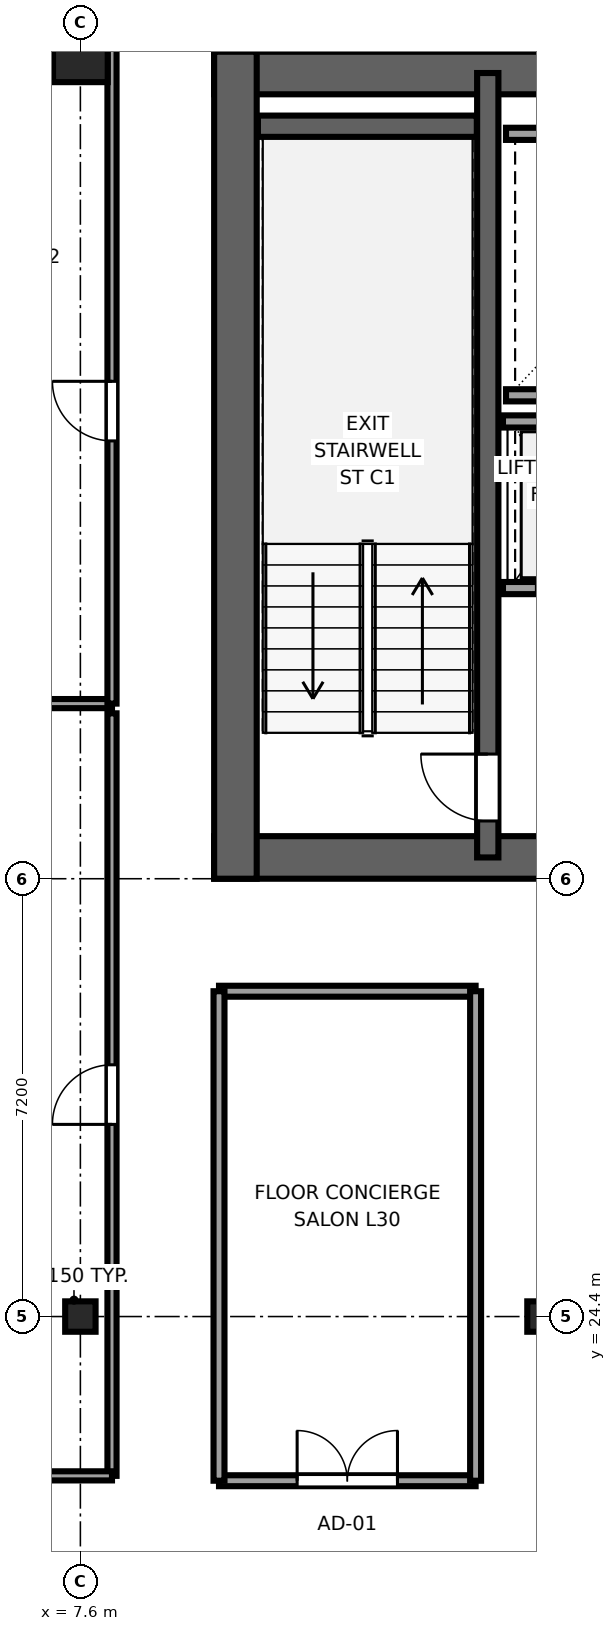
"""IFC4 building model, lengths in metres.
Left out: names, types, materials, properties, quantities, classifications, styles, units other than length and angle.
Written with IfcOpenShell. Run it as: python <this file> out.ifc"""

import sys

from ifc_helpers import new_model, si_unit, direction, frame, frame_2d, origin, origin_2d, place, context, subcontext, project, spatial, rectangle, i_section, extrude, source, transform, mapped, element, fill, save


model = new_model("IFC4")
c1 = context("Model", 3, precision=1e-05, world=origin(), true_north=direction((0.0, 1.0)))
c2 = subcontext(c1, "Body", "Model", "MODEL_VIEW")
j1 = project(units=[si_unit("LENGTHUNIT", "METRE"), si_unit("PLANEANGLEUNIT", "RADIAN")], contexts=[c1])
p1 = place(None, origin())
s1 = spatial("IfcSite", under=j1, at=p1, CompositionType="ELEMENT")
p2 = place(p1, origin())
s2 = spatial("IfcBuilding", under=s1, at=p2, CompositionType="ELEMENT")
p3 = place(p2, frame((0.0, 0.0, 118.65)))
s3 = spatial("IfcBuildingStorey", under=s2, at=p3, CompositionType="ELEMENT", Elevation=118.65)
p4 = place(p3, frame((9.8, 31.95, 0.0), z_axis=(0.0, 0.0, 1.0), x_axis=(1.0, 0.0, 0.0)))
e1 = element("IfcWall", 1, at=p4, inside=s3, PredefinedType="SHEAR", context=c2, shape_type="SweptSolid", body=[
    extrude(rectangle(XDim=26.4, YDim=0.7, at=frame_2d((13.2, 0.0))), origin(), (0.0, 0.0, 1.0), 3.55),
])
p5 = place(p4, frame((7.65, 0.0, 0.0), z_axis=(0.0, 0.0, 1.0), x_axis=(-1.0, 0.0, 0.0)))
e2 = element("IfcOpeningElement", 2, at=p5, cuts=e1, PredefinedType="OPENING", context=c2, shape_type="SweptSolid", body=[
    extrude(rectangle(XDim=1.5, YDim=2.04, at=frame_2d((0.75, 1.02))), frame((0.0, 0.36, 0.0), z_axis=(0.0, -1.0, 0.0), x_axis=(1.0, 0.0, 0.0)), (0.0, 0.0, 1.0), 0.72),
])
p6 = place(p4, frame((13.95, 0.0, 0.0), z_axis=(0.0, 0.0, 1.0), x_axis=(-1.0, 0.0, 0.0)))
e3 = element("IfcOpeningElement", 3, at=p6, cuts=e1, PredefinedType="OPENING", context=c2, shape_type="SweptSolid", body=[
    extrude(rectangle(XDim=1.5, YDim=2.04, at=frame_2d((0.75, 1.02))), frame((0.0, 0.36, 0.0), z_axis=(0.0, -1.0, 0.0), x_axis=(1.0, 0.0, 0.0)), (0.0, 0.0, 1.0), 0.72),
])
p7 = place(p4, frame((20.25, 0.0, 0.0), z_axis=(0.0, 0.0, 1.0), x_axis=(-1.0, 0.0, 0.0)))
e4 = element("IfcOpeningElement", 4, at=p7, cuts=e1, PredefinedType="OPENING", context=c2, shape_type="SweptSolid", body=[
    extrude(rectangle(XDim=1.5, YDim=2.04, at=frame_2d((0.75, 1.02))), frame((0.0, 0.36, 0.0), z_axis=(0.0, -1.0, 0.0), x_axis=(1.0, 0.0, 0.0)), (0.0, 0.0, 1.0), 0.72),
])
p8 = place(p3, frame((9.8, 44.85, 0.0), z_axis=(0.0, 0.0, 1.0), x_axis=(1.0, 0.0, 0.0)))
e5 = element("IfcWall", 5, at=p8, inside=s3, PredefinedType="SHEAR", context=c2, shape_type="SweptSolid", body=[
    extrude(rectangle(XDim=26.4, YDim=0.7, at=frame_2d((13.2, 0.0))), origin(), (0.0, 0.0, 1.0), 3.55),
])
p9 = place(p3, frame((10.15, 31.6, 0.0), z_axis=(0.0, 0.0, 1.0), x_axis=(0.0, 1.0, 0.0)))
e6 = element("IfcWall", 6, at=p9, inside=s3, PredefinedType="SHEAR", context=c2, shape_type="SweptSolid", body=[
    extrude(rectangle(XDim=13.6, YDim=0.7, at=frame_2d((6.8, 0.0))), origin(), (0.0, 0.0, 1.0), 3.55),
])
p10 = place(p3, frame((14.3, 31.95, 0.0), z_axis=(0.0, 0.0, 1.0), x_axis=(0.0, 1.0, 0.0)))
e7 = element("IfcWall", 7, at=p10, inside=s3, PredefinedType="SHEAR", context=c2, shape_type="SweptSolid", body=[
    extrude(rectangle(XDim=12.9, YDim=0.35, at=frame_2d((6.45, 0.0))), origin(), (0.0, 0.0, 1.0), 3.55),
])
p11 = place(p10, frame((0.6, 0.0, 0.0)))
e8 = element("IfcOpeningElement", 8, at=p11, cuts=e7, PredefinedType="OPENING", context=c2, shape_type="SweptSolid", body=[
    extrude(rectangle(XDim=1.1, YDim=2.12, at=frame_2d((0.55, 1.06))), frame((0.0, 0.185, 0.0), z_axis=(0.0, -1.0, 0.0), x_axis=(1.0, 0.0, 0.0)), (0.0, 0.0, 1.0), 0.37),
])
p12 = place(p3, frame((10.52, 43.975, 0.0), z_axis=(0.0, 0.0, 1.0), x_axis=(1.0, 0.0, 0.0)))
e9 = element("IfcWall", 9, at=p12, inside=s3, PredefinedType="SHEAR", context=c2, shape_type="SweptSolid", body=[
    extrude(rectangle(XDim=3.6, YDim=0.35, at=frame_2d((1.8, 0.0))), origin(), (0.0, 0.0, 1.0), 3.55),
])
m1 = source(origin(), c2, "Body", "SweptSolid", [
    extrude(i_section(OverallWidth=0.5, OverallDepth=0.5, WebThickness=0.022, FlangeThickness=0.034, at=origin_2d()), origin(), (0.0, 0.0, 1.0), 3.55),
])
for number, where, z_axis, x_axis in (
    (10, (7.6, 24.4, 0.0), (0.0, 0.0, 1.0), (1.0, 0.0, 0.0)),
    (11, (15.2, 24.4, 0.0), (0.0, 0.0, 1.0), (1.0, 0.0, 0.0)),
):
    element("IfcColumn", number, at=place(p3, frame(where, z_axis=z_axis, x_axis=x_axis)), inside=s3, PredefinedType="COLUMN", context=c2, shape_type="MappedRepresentation", body=[
        mapped(m1, transform((0.0, 0.0, 0.0), x_axis=(1.0, 0.0, 0.0), y_axis=(0.0, 1.0, 0.0), z_axis=(0.0, 0.0, 1.0), scale=1.0)),
    ])
m2 = source(origin(), c2, "Body", "SweptSolid", [
    extrude(rectangle(XDim=0.9, YDim=0.9, at=origin_2d()), origin(), (0.0, 0.0, 1.0), 3.55),
])
p13 = place(p3, frame((7.6, 45.15, 0.0), z_axis=(0.0, 0.0, 1.0), x_axis=(1.0, 0.0, 0.0)))
e12 = element("IfcColumn", 12, at=p13, inside=s3, PredefinedType="COLUMN", context=c2, shape_type="MappedRepresentation", body=[
    mapped(m2, transform((0.0, 0.0, 0.0), x_axis=(1.0, 0.0, 0.0), y_axis=(0.0, 1.0, 0.0), z_axis=(0.0, 0.0, 1.0), scale=1.0)),
])
for number, where, z_axis, x_axis in (
    (13, (14.6, 39.55, 0.0), (0.0, 0.0, 1.0), (1.0, 0.0, 0.0)),
    (14, (14.6, 43.85, 0.0), (0.0, 0.0, 1.0), (1.0, 0.0, 0.0)),
):
    element("IfcWall", number, at=place(p3, frame(where, z_axis=z_axis, x_axis=x_axis)), inside=s3, PredefinedType="SOLIDWALL", context=c2, shape_type="SweptSolid", body=[
        extrude(rectangle(XDim=4.1, YDim=0.2, at=frame_2d((2.05, 0.0))), origin(), (0.0, 0.0, 1.0), 3.37),
    ])
p14 = place(p3, frame((14.55, 36.38, 0.0), z_axis=(0.0, 0.0, 1.0), x_axis=(1.0, 0.0, 0.0)))
e15 = element("IfcWall", 15, at=p14, inside=s3, PredefinedType="SOLIDWALL", context=c2, shape_type="SweptSolid", body=[
    extrude(rectangle(XDim=4.075, YDim=0.2, at=frame_2d((2.038, 0.0))), origin(), (0.0, 0.0, 1.0), 3.37),
])
p15 = place(p14, frame((0.55, 0.0, 0.0)))
e16 = element("IfcOpeningElement", 16, at=p15, cuts=e15, PredefinedType="OPENING", context=c2, shape_type="SweptSolid", body=[
    extrude(rectangle(XDim=1.1, YDim=2.12, at=frame_2d((0.55, 1.06))), frame((0.0, 0.11, 0.0), z_axis=(0.0, -1.0, 0.0), x_axis=(1.0, 0.0, 0.0)), (0.0, 0.0, 1.0), 0.22),
])
p16 = place(p14, frame((2.45, 0.0, 0.0)))
e17 = element("IfcOpeningElement", 17, at=p16, cuts=e15, PredefinedType="OPENING", context=c2, shape_type="SweptSolid", body=[
    extrude(rectangle(XDim=1.1, YDim=2.12, at=frame_2d((0.55, 1.06))), frame((0.0, 0.11, 0.0), z_axis=(0.0, -1.0, 0.0), x_axis=(1.0, 0.0, 0.0)), (0.0, 0.0, 1.0), 0.22),
])
p17 = place(p3, frame((14.55, 39.12, 0.0), z_axis=(0.0, 0.0, 1.0), x_axis=(1.0, 0.0, 0.0)))
e18 = element("IfcWall", 18, at=p17, inside=s3, PredefinedType="SOLIDWALL", context=c2, shape_type="SweptSolid", body=[
    extrude(rectangle(XDim=4.075, YDim=0.2, at=frame_2d((2.038, 0.0))), origin(), (0.0, 0.0, 1.0), 3.37),
])
p18 = place(p3, frame((0.405, 34.48, 0.0), z_axis=(0.0, 0.0, 1.0), x_axis=(1.0, 0.0, 0.0)))
e19 = element("IfcWall", 19, at=p18, inside=s3, PredefinedType="PARTITIONING", context=c2, shape_type="SweptSolid", body=[
    extrude(rectangle(XDim=7.715, YDim=0.15, at=frame_2d((3.857, 0.0))), origin(), (0.0, 0.0, 1.0), 3.37),
])
p19 = place(p3, frame((8.12, 21.78, 0.0), z_axis=(0.0, 0.0, 1.0), x_axis=(0.0, 1.0, 0.0)))
e20 = element("IfcWall", 20, at=p19, inside=s3, PredefinedType="PARTITIONING", context=c2, shape_type="SweptSolid", body=[
    extrude(rectangle(XDim=12.54, YDim=0.15, at=frame_2d((6.27, 0.0))), origin(), (0.0, 0.0, 1.0), 3.37),
])
p20 = place(p19, frame((5.78, 0.0, 0.0)))
e21 = element("IfcOpeningElement", 21, at=p20, cuts=e20, PredefinedType="OPENING", context=c2, shape_type="SweptSolid", body=[
    extrude(rectangle(XDim=0.98, YDim=2.12, at=frame_2d((0.49, 1.06))), frame((0.0, 0.085, 0.0), z_axis=(0.0, -1.0, 0.0), x_axis=(1.0, 0.0, 0.0)), (0.0, 0.0, 1.0), 0.17),
])
p21 = place(p3, frame((2.77, 21.78, 0.0), z_axis=(0.0, 0.0, 1.0), x_axis=(1.0, 0.0, 0.0)))
e22 = element("IfcWall", 22, at=p21, inside=s3, PredefinedType="PARTITIONING", context=c2, shape_type="SweptSolid", body=[
    extrude(rectangle(XDim=5.35, YDim=0.15, at=frame_2d((2.675, 0.0))), origin(), (0.0, 0.0, 1.0), 3.37),
])
p22 = place(p3, frame((8.12, 34.48, 0.0), z_axis=(0.0, 0.0, 1.0), x_axis=(0.0, 1.0, 0.0)))
e23 = element("IfcWall", 23, at=p22, inside=s3, PredefinedType="PARTITIONING", context=c2, shape_type="SweptSolid", body=[
    extrude(rectangle(XDim=11.115, YDim=0.15, at=frame_2d((5.558, 0.0))), origin(), (0.0, 0.0, 1.0), 3.37),
])
p23 = place(p22, frame((4.32, 0.0, 0.0)))
e24 = element("IfcOpeningElement", 24, at=p23, cuts=e23, PredefinedType="OPENING", context=c2, shape_type="SweptSolid", body=[
    extrude(rectangle(XDim=0.98, YDim=2.12, at=frame_2d((0.49, 1.06))), frame((0.0, 0.085, 0.0), z_axis=(0.0, -1.0, 0.0), x_axis=(1.0, 0.0, 0.0)), (0.0, 0.0, 1.0), 0.17),
])
p24 = place(p3, frame((9.88, 21.7, 0.0), z_axis=(0.0, 0.0, 1.0), x_axis=(1.0, 0.0, 0.0)))
e25 = element("IfcWall", 25, at=p24, inside=s3, PredefinedType="PARTITIONING", context=c2, shape_type="SweptSolid", body=[
    extrude(rectangle(XDim=4.22, YDim=0.18, at=frame_2d((2.11, 0.0))), origin(), (0.0, 0.0, 1.0), 3.37),
])
p25 = place(p24, frame((1.285, 0.0, 0.0)))
e26 = element("IfcOpeningElement", 26, at=p25, cuts=e25, PredefinedType="OPENING", context=c2, shape_type="SweptSolid", body=[
    extrude(rectangle(XDim=1.65, YDim=2.15, at=frame_2d((0.825, 1.075))), frame((0.0, 0.1, 0.0), z_axis=(0.0, -1.0, 0.0), x_axis=(1.0, 0.0, 0.0)), (0.0, 0.0, 1.0), 0.2),
])
p26 = place(p3, frame((9.88, 29.75, 0.0), z_axis=(0.0, 0.0, 1.0), x_axis=(1.0, 0.0, 0.0)))
e27 = element("IfcWall", 27, at=p26, inside=s3, PredefinedType="PARTITIONING", context=c2, shape_type="SweptSolid", body=[
    extrude(rectangle(XDim=4.22, YDim=0.18, at=frame_2d((2.11, 0.0))), origin(), (0.0, 0.0, 1.0), 3.37),
])
for number, where, z_axis, x_axis in (
    (28, (9.88, 21.7, 0.0), (0.0, 0.0, 1.0), (0.0, 1.0, 0.0)),
    (29, (14.1, 21.7, 0.0), (0.0, 0.0, 1.0), (0.0, 1.0, 0.0)),
):
    element("IfcWall", number, at=place(p3, frame(where, z_axis=z_axis, x_axis=x_axis)), inside=s3, PredefinedType="PARTITIONING", context=c2, shape_type="SweptSolid", body=[
        extrude(rectangle(XDim=8.05, YDim=0.18, at=frame_2d((4.025, 0.0))), origin(), (0.0, 0.0, 1.0), 3.37),
    ])
m3 = source(origin(), c2, "Body", "SweptSolid", [
    extrude(rectangle(XDim=1.1, YDim=2.12, at=frame_2d((0.55, 1.06))), frame((0.0, 0.025, 0.0), z_axis=(0.0, -1.0, 0.0), x_axis=(1.0, 0.0, 0.0)), (0.0, 0.0, 1.0), 0.05),
])
p27 = place(p11, origin())
e30 = element("IfcDoor", 30, at=p27, inside=s3, OperationType="SINGLE_SWING_RIGHT", PredefinedType="DOOR", context=c2, shape_type="MappedRepresentation", body=[
    mapped(m3, transform((0.0, 0.0, 0.0), x_axis=(1.0, 0.0, 0.0), y_axis=(0.0, 1.0, 0.0), z_axis=(0.0, 0.0, 1.0), scale=1.0)),
])
fill(e8, e30)
m4 = source(origin(), c2, "Body", "SweptSolid", [
    extrude(rectangle(XDim=0.98, YDim=2.12, at=frame_2d((0.49, 1.06))), frame((0.0, 0.025, 0.0), z_axis=(0.0, -1.0, 0.0), x_axis=(1.0, 0.0, 0.0)), (0.0, 0.0, 1.0), 0.05),
])
p28 = place(p20, origin())
e31 = element("IfcDoor", 31, at=p28, inside=s3, OperationType="SINGLE_SWING_LEFT", PredefinedType="DOOR", context=c2, shape_type="MappedRepresentation", body=[
    mapped(m4, transform((0.0, 0.0, 0.0), x_axis=(1.0, 0.0, 0.0), y_axis=(0.0, 1.0, 0.0), z_axis=(0.0, 0.0, 1.0), scale=1.0)),
])
fill(e21, e31)
p29 = place(p23, origin())
e32 = element("IfcDoor", 32, at=p29, inside=s3, OperationType="SINGLE_SWING_RIGHT", PredefinedType="DOOR", context=c2, shape_type="MappedRepresentation", body=[
    mapped(m4, transform((0.0, 0.0, 0.0), x_axis=(1.0, 0.0, 0.0), y_axis=(0.0, 1.0, 0.0), z_axis=(0.0, 0.0, 1.0), scale=1.0)),
])
fill(e24, e32)
m5 = source(origin(), c2, "Body", "SweptSolid", [
    extrude(rectangle(XDim=1.65, YDim=2.15, at=frame_2d((0.825, 1.075))), frame((0.0, 0.025, 0.0), z_axis=(0.0, -1.0, 0.0), x_axis=(1.0, 0.0, 0.0)), (0.0, 0.0, 1.0), 0.05),
])
p30 = place(p25, origin())
e33 = element("IfcDoor", 33, at=p30, inside=s3, OperationType="DOUBLE_DOOR_SINGLE_SWING", PredefinedType="DOOR", context=c2, shape_type="MappedRepresentation", body=[
    mapped(m5, transform((0.0, 0.0, 0.0), x_axis=(1.0, 0.0, 0.0), y_axis=(0.0, 1.0, 0.0), z_axis=(0.0, 0.0, 1.0), scale=1.0)),
])
fill(e26, e33)
save(model, sys.argv[1])
